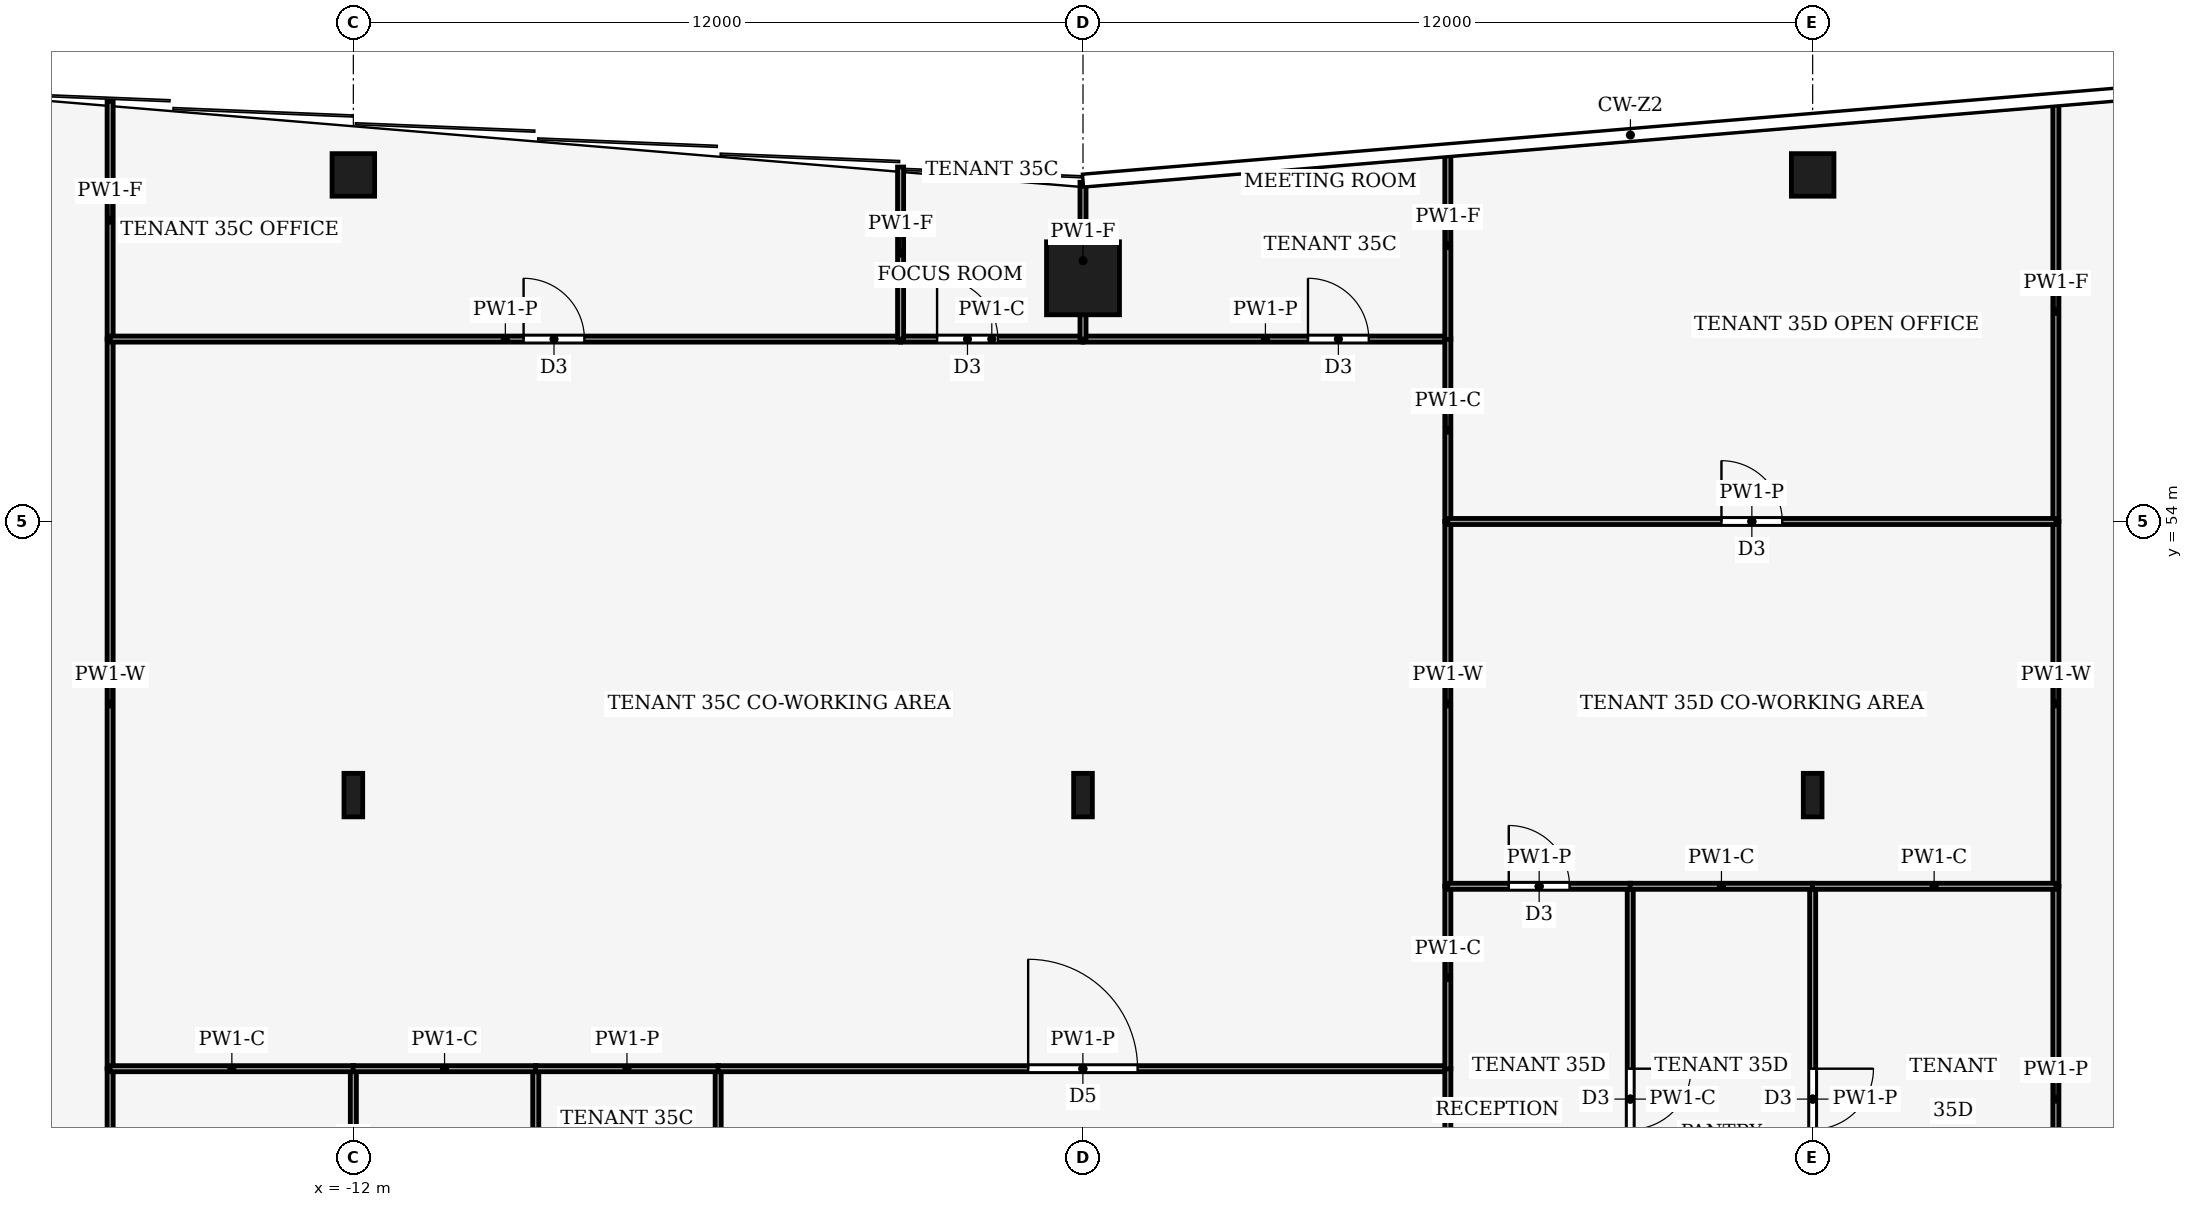
"""IFC4 building model, lengths in metres.
Left out: names, types, materials, properties, quantities, classifications, styles, units other than length and angle.
Written with IfcOpenShell. Run it as: python <this file> out.ifc"""

import sys

from ifc_helpers import new_model, si_unit, direction, frame, frame_2d, origin, origin_2d, place, context, subcontext, project, spatial, rectangle, hollow_rectangle, i_section, extrude, element, fill, save


model = new_model("IFC4")
c1 = context("Model", 3, precision=1e-05, world=origin(), true_north=direction((0.0, 1.0)))
c2 = subcontext(c1, "Body", "Model", "MODEL_VIEW")
j1 = project(units=[si_unit("LENGTHUNIT", "METRE"), si_unit("PLANEANGLEUNIT", "RADIAN")], contexts=[c1])
p1 = place(None, origin())
s1 = spatial("IfcSite", under=j1, at=p1, CompositionType="ELEMENT")
p2 = place(p1, origin())
s2 = spatial("IfcBuilding", under=s1, at=p2, CompositionType="ELEMENT")
p3 = place(p2, frame((0.0, 0.0, 154.0)))
s3 = spatial("IfcBuildingStorey", under=s2, at=p3, CompositionType="ELEMENT", Elevation=154.0)
p4 = place(p3, frame((0.0, 58.0, 0.0), z_axis=(0.0, 0.0, 1.0), x_axis=(1.0, 0.0, 0.0)))
e1 = element("IfcColumn", 1, at=p4, inside=s3, PredefinedType="COLUMN", context=c2, shape_type="SweptSolid", body=[
    extrude(hollow_rectangle(XDim=1.2, YDim=1.2, WallThickness=0.07, at=origin_2d()), origin(), (0.0, 0.0, 1.0), 4.0),
])
for number, where, z_axis, x_axis in (
    (2, (-12.0, 59.7, 0.0), (0.0, 0.0, 1.0), (1.0, 0.0, 0.0)),
    (3, (12.0, 59.7, 0.0), (0.0, 0.0, 1.0), (1.0, 0.0, 0.0)),
):
    element("IfcColumn", number, at=place(p3, frame(where, z_axis=z_axis, x_axis=x_axis)), inside=s3, PredefinedType="COLUMN", context=c2, shape_type="SweptSolid", body=[
        extrude(hollow_rectangle(XDim=0.7, YDim=0.7, WallThickness=0.03, at=origin_2d()), origin(), (0.0, 0.0, 1.0), 4.0),
    ])
for number, where, z_axis, x_axis in (
    (4, (-12.0, 49.5, 0.0), (0.0, 0.0, 1.0), (1.0, 0.0, 0.0)),
    (5, (0.0, 49.5, 0.0), (0.0, 0.0, 1.0), (1.0, 0.0, 0.0)),
    (6, (12.0, 49.5, 0.0), (0.0, 0.0, 1.0), (1.0, 0.0, 0.0)),
):
    element("IfcColumn", number, at=place(p3, frame(where, z_axis=z_axis, x_axis=x_axis)), inside=s3, PredefinedType="COLUMN", context=c2, shape_type="SweptSolid", body=[
        extrude(i_section(OverallWidth=0.308, OverallDepth=0.716, WebThickness=0.021, FlangeThickness=0.04, FilletRadius=0.027, at=origin_2d()), origin(), (0.0, 0.0, 1.0), 4.0),
    ])
p5 = place(p3, frame((-16.0, 41.0, 0.0), z_axis=(0.0, 0.0, 1.0), x_axis=(0.0, 1.0, 0.0)))
e7 = element("IfcWall", 7, at=p5, inside=s3, PredefinedType="PARTITIONING", context=c2, shape_type="SweptSolid", body=[
    extrude(rectangle(XDim=4.0, YDim=0.1, at=frame_2d((2.0, 0.0))), origin(), (0.0, 0.0, 1.0), 3.44),
])
p6 = place(p3, frame((-16.0, 45.0, 0.0), z_axis=(0.0, 0.0, 1.0), x_axis=(0.0, 1.0, 0.0)))
e8 = element("IfcWall", 8, at=p6, inside=s3, PredefinedType="PARTITIONING", context=c2, shape_type="SweptSolid", body=[
    extrude(rectangle(XDim=12.0, YDim=0.1, at=frame_2d((6.0, 0.0))), origin(), (0.0, 0.0, 1.0), 3.24),
])
p7 = place(p3, frame((-16.0, 57.0, 0.0), z_axis=(0.0, 0.0, 1.0), x_axis=(0.0, 1.0, 0.0)))
e9 = element("IfcWall", 9, at=p7, inside=s3, PredefinedType="PARTITIONING", context=c2, shape_type="SweptSolid", body=[
    extrude(rectangle(XDim=3.913, YDim=0.1, at=frame_2d((1.957, 0.0))), origin(), (0.0, 0.0, 1.0), 3.04),
])
p8 = place(p3, frame((16.0, 48.0, 0.0), z_axis=(0.0, 0.0, 1.0), x_axis=(0.0, -1.0, 0.0)))
e10 = element("IfcWall", 10, at=p8, inside=s3, PredefinedType="PARTITIONING", context=c2, shape_type="SweptSolid", body=[
    extrude(rectangle(XDim=7.0, YDim=0.1, at=frame_2d((3.5, 0.0))), origin(), (0.0, 0.0, 1.0), 3.44),
])
p9 = place(p3, frame((16.0, 54.0, 0.0), z_axis=(0.0, 0.0, 1.0), x_axis=(0.0, -1.0, 0.0)))
e11 = element("IfcWall", 11, at=p9, inside=s3, PredefinedType="PARTITIONING", context=c2, shape_type="SweptSolid", body=[
    extrude(rectangle(XDim=6.0, YDim=0.1, at=frame_2d((3.0, 0.0))), origin(), (0.0, 0.0, 1.0), 3.24),
])
p10 = place(p3, frame((16.0, 60.913, 0.0), z_axis=(0.0, 0.0, 1.0), x_axis=(0.0, -1.0, 0.0)))
e12 = element("IfcWall", 12, at=p10, inside=s3, PredefinedType="PARTITIONING", context=c2, shape_type="SweptSolid", body=[
    extrude(rectangle(XDim=6.913, YDim=0.1, at=frame_2d((3.457, 0.0))), origin(), (0.0, 0.0, 1.0), 3.04),
])
p11 = place(p3, frame((-12.0, 45.0, 0.0), z_axis=(0.0, 0.0, 1.0), x_axis=(0.0, -1.0, 0.0)))
e13 = element("IfcWall", 13, at=p11, inside=s3, PredefinedType="PARTITIONING", context=c2, shape_type="SweptSolid", body=[
    extrude(rectangle(XDim=4.0, YDim=0.1, at=frame_2d((2.0, 0.0))), origin(), (0.0, 0.0, 1.0), 3.44),
])
p12 = place(p11, frame((1.1, 0.0, 0.0)))
e14 = element("IfcOpeningElement", 14, at=p12, cuts=e13, PredefinedType="OPENING", context=c2, shape_type="SweptSolid", body=[
    extrude(rectangle(XDim=1.0, YDim=2.1, at=frame_2d((0.5, 1.05))), frame((0.0, 0.06, 0.0), z_axis=(0.0, -1.0, 0.0), x_axis=(1.0, 0.0, 0.0)), (0.0, 0.0, 1.0), 0.12),
])
p13 = place(p3, frame((-11.996, 45.0, 0.0), z_axis=(0.0, 0.0, 1.0), x_axis=(-1.0, 0.0, 0.0)))
e15 = element("IfcWall", 15, at=p13, inside=s3, PredefinedType="PARTITIONING", context=c2, shape_type="SweptSolid", body=[
    extrude(rectangle(XDim=4.004, YDim=0.1, at=frame_2d((2.002, 0.0))), origin(), (0.0, 0.0, 1.0), 3.87),
])
p14 = place(p3, frame((-9.0, 41.0, 0.0), z_axis=(0.0, 0.0, 1.0), x_axis=(0.0, 1.0, 0.0)))
e16 = element("IfcWall", 16, at=p14, inside=s3, PredefinedType="PARTITIONING", context=c2, shape_type="SweptSolid", body=[
    extrude(rectangle(XDim=4.0, YDim=0.1, at=frame_2d((2.0, 0.0))), origin(), (0.0, 0.0, 1.0), 3.87),
])
p15 = place(p3, frame((-8.996, 45.0, 0.0), z_axis=(0.0, 0.0, 1.0), x_axis=(-1.0, 0.0, 0.0)))
e17 = element("IfcWall", 17, at=p15, inside=s3, PredefinedType="PARTITIONING", context=c2, shape_type="SweptSolid", body=[
    extrude(rectangle(XDim=3.008, YDim=0.1, at=frame_2d((1.504, 0.0))), origin(), (0.0, 0.0, 1.0), 3.87),
])
p16 = place(p3, frame((-6.0, 41.0, 0.0), z_axis=(0.0, 0.0, 1.0), x_axis=(0.0, 1.0, 0.0)))
e18 = element("IfcWall", 18, at=p16, inside=s3, PredefinedType="PARTITIONING", context=c2, shape_type="SweptSolid", body=[
    extrude(rectangle(XDim=4.0, YDim=0.1, at=frame_2d((2.0, 0.0))), origin(), (0.0, 0.0, 1.0), 3.87),
])
p17 = place(p16, frame((1.5, 0.0, 0.0)))
e19 = element("IfcOpeningElement", 19, at=p17, cuts=e18, PredefinedType="OPENING", context=c2, shape_type="SweptSolid", body=[
    extrude(rectangle(XDim=1.0, YDim=2.1, at=frame_2d((0.5, 1.05))), frame((0.0, 0.06, 0.0), z_axis=(0.0, -1.0, 0.0), x_axis=(1.0, 0.0, 0.0)), (0.0, 0.0, 1.0), 0.12),
])
p18 = place(p3, frame((-5.996, 45.0, 0.0), z_axis=(0.0, 0.0, 1.0), x_axis=(-1.0, 0.0, 0.0)))
e20 = element("IfcWall", 20, at=p18, inside=s3, PredefinedType="PARTITIONING", context=c2, shape_type="SweptSolid", body=[
    extrude(rectangle(XDim=3.008, YDim=0.1, at=frame_2d((1.504, 0.0))), origin(), (0.0, 0.0, 1.0), 3.44),
])
p19 = place(p3, frame((-6.004, 45.0, 0.0), z_axis=(0.0, 0.0, 1.0), x_axis=(1.0, 0.0, 0.0)))
e21 = element("IfcWall", 21, at=p19, inside=s3, PredefinedType="PARTITIONING", context=c2, shape_type="SweptSolid", body=[
    extrude(rectangle(XDim=12.004, YDim=0.1, at=frame_2d((6.002, 0.0))), origin(), (0.0, 0.0, 1.0), 3.44),
])
p20 = place(p19, frame((5.102, 0.0, 0.0)))
e22 = element("IfcOpeningElement", 22, at=p20, cuts=e21, PredefinedType="OPENING", context=c2, shape_type="SweptSolid", body=[
    extrude(rectangle(XDim=1.8, YDim=2.1, at=frame_2d((0.9, 1.05))), frame((0.0, 0.06, 0.0), z_axis=(0.0, -1.0, 0.0), x_axis=(1.0, 0.0, 0.0)), (0.0, 0.0, 1.0), 0.12),
])
p21 = place(p3, frame((6.0, 41.0, 0.0), z_axis=(0.0, 0.0, 1.0), x_axis=(0.0, 1.0, 0.0)))
e23 = element("IfcWall", 23, at=p21, inside=s3, PredefinedType="PARTITIONING", context=c2, shape_type="SweptSolid", body=[
    extrude(rectangle(XDim=4.004, YDim=0.1, at=frame_2d((2.002, 0.0))), origin(), (0.0, 0.0, 1.0), 3.87),
])
p22 = place(p3, frame((-16.0, 57.0, 0.0), z_axis=(0.0, 0.0, 1.0), x_axis=(1.0, 0.0, 0.0)))
e24 = element("IfcWall", 24, at=p22, inside=s3, PredefinedType="PARTITIONING", context=c2, shape_type="SweptSolid", body=[
    extrude(rectangle(XDim=13.0, YDim=0.1, at=frame_2d((6.5, 0.0))), origin(), (0.0, 0.0, 1.0), 3.44),
])
p23 = place(p22, frame((6.8, 0.0, 0.0)))
e25 = element("IfcOpeningElement", 25, at=p23, cuts=e24, PredefinedType="OPENING", context=c2, shape_type="SweptSolid", body=[
    extrude(rectangle(XDim=1.0, YDim=2.1, at=frame_2d((0.5, 1.05))), frame((0.0, 0.06, 0.0), z_axis=(0.0, -1.0, 0.0), x_axis=(1.0, 0.0, 0.0)), (0.0, 0.0, 1.0), 0.12),
])
p24 = place(p3, frame((-3.0, 57.0, 0.0), z_axis=(0.0, 0.0, 1.0), x_axis=(1.0, 0.0, 0.0)))
e26 = element("IfcWall", 26, at=p24, inside=s3, PredefinedType="PARTITIONING", context=c2, shape_type="SweptSolid", body=[
    extrude(rectangle(XDim=3.0, YDim=0.1, at=frame_2d((1.5, 0.0))), origin(), (0.0, 0.0, 1.0), 3.87),
])
p25 = place(p24, frame((0.6, 0.0, 0.0)))
e27 = element("IfcOpeningElement", 27, at=p25, cuts=e26, PredefinedType="OPENING", context=c2, shape_type="SweptSolid", body=[
    extrude(rectangle(XDim=1.0, YDim=2.1, at=frame_2d((0.5, 1.05))), frame((0.0, 0.06, 0.0), z_axis=(0.0, -1.0, 0.0), x_axis=(1.0, 0.0, 0.0)), (0.0, 0.0, 1.0), 0.12),
])
p26 = place(p3, frame((0.0, 57.0, 0.0), z_axis=(0.0, 0.0, 1.0), x_axis=(1.0, 0.0, 0.0)))
e28 = element("IfcWall", 28, at=p26, inside=s3, PredefinedType="PARTITIONING", context=c2, shape_type="SweptSolid", body=[
    extrude(rectangle(XDim=6.0, YDim=0.1, at=frame_2d((3.0, 0.0))), origin(), (0.0, 0.0, 1.0), 3.44),
])
p27 = place(p26, frame((3.7, 0.0, 0.0)))
e29 = element("IfcOpeningElement", 29, at=p27, cuts=e28, PredefinedType="OPENING", context=c2, shape_type="SweptSolid", body=[
    extrude(rectangle(XDim=1.0, YDim=2.1, at=frame_2d((0.5, 1.05))), frame((0.0, 0.06, 0.0), z_axis=(0.0, -1.0, 0.0), x_axis=(1.0, 0.0, 0.0)), (0.0, 0.0, 1.0), 0.12),
])
p28 = place(p3, frame((6.0, 44.996, 0.0), z_axis=(0.0, 0.0, 1.0), x_axis=(0.0, 1.0, 0.0)))
e30 = element("IfcWall", 30, at=p28, inside=s3, PredefinedType="PARTITIONING", context=c2, shape_type="SweptSolid", body=[
    extrude(rectangle(XDim=3.004, YDim=0.1, at=frame_2d((1.502, 0.0))), origin(), (0.0, 0.0, 1.0), 3.87),
])
p29 = place(p3, frame((6.0, 48.0, 0.0), z_axis=(0.0, 0.0, 1.0), x_axis=(0.0, 1.0, 0.0)))
e31 = element("IfcWall", 31, at=p29, inside=s3, PredefinedType="PARTITIONING", context=c2, shape_type="SweptSolid", body=[
    extrude(rectangle(XDim=6.0, YDim=0.1, at=frame_2d((3.0, 0.0))), origin(), (0.0, 0.0, 1.0), 3.24),
])
p30 = place(p3, frame((6.0, 54.0, 0.0), z_axis=(0.0, 0.0, 1.0), x_axis=(0.0, 1.0, 0.0)))
e32 = element("IfcWall", 32, at=p30, inside=s3, PredefinedType="PARTITIONING", context=c2, shape_type="SweptSolid", body=[
    extrude(rectangle(XDim=3.004, YDim=0.1, at=frame_2d((1.502, 0.0))), origin(), (0.0, 0.0, 1.0), 3.87),
])
p31 = place(p3, frame((-3.0, 57.0, 0.0), z_axis=(0.0, 0.0, 1.0), x_axis=(0.0, 1.0, 0.0)))
e33 = element("IfcWall", 33, at=p31, inside=s3, PredefinedType="PARTITIONING", context=c2, shape_type="SweptSolid", body=[
    extrude(rectangle(XDim=2.83, YDim=0.1, at=frame_2d((1.415, 0.0))), origin(), (0.0, 0.0, 1.0), 3.04),
])
p32 = place(p3, frame((0.0, 57.0, 0.0), z_axis=(0.0, 0.0, 1.0), x_axis=(0.0, 1.0, 0.0)))
e34 = element("IfcWall", 34, at=p32, inside=s3, PredefinedType="PARTITIONING", context=c2, shape_type="SweptSolid", body=[
    extrude(rectangle(XDim=2.58, YDim=0.1, at=frame_2d((1.29, 0.0))), origin(), (0.0, 0.0, 1.0), 3.04),
])
p33 = place(p3, frame((6.0, 56.996, 0.0), z_axis=(0.0, 0.0, 1.0), x_axis=(0.0, 1.0, 0.0)))
e35 = element("IfcWall", 35, at=p33, inside=s3, PredefinedType="PARTITIONING", context=c2, shape_type="SweptSolid", body=[
    extrude(rectangle(XDim=3.084, YDim=0.1, at=frame_2d((1.542, 0.0))), origin(), (0.0, 0.0, 1.0), 3.04),
])
p34 = place(p3, frame((9.0, 48.0, 0.0), z_axis=(0.0, 0.0, 1.0), x_axis=(0.0, -1.0, 0.0)))
e36 = element("IfcWall", 36, at=p34, inside=s3, PredefinedType="PARTITIONING", context=c2, shape_type="SweptSolid", body=[
    extrude(rectangle(XDim=7.0, YDim=0.1, at=frame_2d((3.5, 0.0))), origin(), (0.0, 0.0, 1.0), 3.87),
])
p35 = place(p34, frame((3.0, 0.0, 0.0)))
e37 = element("IfcOpeningElement", 37, at=p35, cuts=e36, PredefinedType="OPENING", context=c2, shape_type="SweptSolid", body=[
    extrude(rectangle(XDim=1.0, YDim=2.1, at=frame_2d((0.5, 1.05))), frame((0.0, 0.06, 0.0), z_axis=(0.0, -1.0, 0.0), x_axis=(1.0, 0.0, 0.0)), (0.0, 0.0, 1.0), 0.12),
])
p36 = place(p3, frame((6.0, 48.0, 0.0), z_axis=(0.0, 0.0, 1.0), x_axis=(1.0, 0.0, 0.0)))
e38 = element("IfcWall", 38, at=p36, inside=s3, PredefinedType="PARTITIONING", context=c2, shape_type="SweptSolid", body=[
    extrude(rectangle(XDim=3.004, YDim=0.1, at=frame_2d((1.502, 0.0))), origin(), (0.0, 0.0, 1.0), 3.44),
])
p37 = place(p36, frame((1.002, 0.0, 0.0)))
e39 = element("IfcOpeningElement", 39, at=p37, cuts=e38, PredefinedType="OPENING", context=c2, shape_type="SweptSolid", body=[
    extrude(rectangle(XDim=1.0, YDim=2.1, at=frame_2d((0.5, 1.05))), frame((0.0, 0.06, 0.0), z_axis=(0.0, -1.0, 0.0), x_axis=(1.0, 0.0, 0.0)), (0.0, 0.0, 1.0), 0.12),
])
p38 = place(p3, frame((12.0, 48.0, 0.0), z_axis=(0.0, 0.0, 1.0), x_axis=(0.0, -1.0, 0.0)))
e40 = element("IfcWall", 40, at=p38, inside=s3, PredefinedType="PARTITIONING", context=c2, shape_type="SweptSolid", body=[
    extrude(rectangle(XDim=7.0, YDim=0.1, at=frame_2d((3.5, 0.0))), origin(), (0.0, 0.0, 1.0), 3.44),
])
p39 = place(p38, frame((3.0, 0.0, 0.0)))
e41 = element("IfcOpeningElement", 41, at=p39, cuts=e40, PredefinedType="OPENING", context=c2, shape_type="SweptSolid", body=[
    extrude(rectangle(XDim=1.0, YDim=2.1, at=frame_2d((0.5, 1.05))), frame((0.0, 0.06, 0.0), z_axis=(0.0, -1.0, 0.0), x_axis=(1.0, 0.0, 0.0)), (0.0, 0.0, 1.0), 0.12),
])
p40 = place(p3, frame((12.004, 48.0, 0.0), z_axis=(0.0, 0.0, 1.0), x_axis=(-1.0, 0.0, 0.0)))
e42 = element("IfcWall", 42, at=p40, inside=s3, PredefinedType="PARTITIONING", context=c2, shape_type="SweptSolid", body=[
    extrude(rectangle(XDim=3.008, YDim=0.1, at=frame_2d((1.504, 0.0))), origin(), (0.0, 0.0, 1.0), 3.87),
])
p41 = place(p3, frame((16.0, 48.0, 0.0), z_axis=(0.0, 0.0, 1.0), x_axis=(-1.0, 0.0, 0.0)))
e43 = element("IfcWall", 43, at=p41, inside=s3, PredefinedType="PARTITIONING", context=c2, shape_type="SweptSolid", body=[
    extrude(rectangle(XDim=4.004, YDim=0.1, at=frame_2d((2.002, 0.0))), origin(), (0.0, 0.0, 1.0), 3.87),
])
p42 = place(p3, frame((6.0, 54.0, 0.0), z_axis=(0.0, 0.0, 1.0), x_axis=(1.0, 0.0, 0.0)))
e44 = element("IfcWall", 44, at=p42, inside=s3, PredefinedType="PARTITIONING", context=c2, shape_type="SweptSolid", body=[
    extrude(rectangle(XDim=10.0, YDim=0.1, at=frame_2d((5.0, 0.0))), origin(), (0.0, 0.0, 1.0), 3.44),
])
p43 = place(p42, frame((4.5, 0.0, 0.0)))
e45 = element("IfcOpeningElement", 45, at=p43, cuts=e44, PredefinedType="OPENING", context=c2, shape_type="SweptSolid", body=[
    extrude(rectangle(XDim=1.0, YDim=2.1, at=frame_2d((0.5, 1.05))), frame((0.0, 0.06, 0.0), z_axis=(0.0, -1.0, 0.0), x_axis=(1.0, 0.0, 0.0)), (0.0, 0.0, 1.0), 0.12),
])
p44 = place(p20, origin())
e46 = element("IfcDoor", 46, at=p44, inside=s3, OperationType="DOUBLE_DOOR_SINGLE_SWING", PredefinedType="DOOR", context=c2, shape_type="SweptSolid", body=[
    extrude(rectangle(XDim=1.8, YDim=2.1, at=frame_2d((0.9, 1.05))), frame((0.0, 0.025, 0.0), z_axis=(0.0, -1.0, 0.0), x_axis=(1.0, 0.0, 0.0)), (0.0, 0.0, 1.0), 0.05),
])
fill(e22, e46)
p45 = place(p23, origin())
e47 = element("IfcDoor", 47, at=p45, inside=s3, OperationType="SINGLE_SWING_RIGHT", PredefinedType="DOOR", context=c2, shape_type="SweptSolid", body=[
    extrude(rectangle(XDim=1.0, YDim=2.1, at=frame_2d((0.5, 1.05))), frame((0.0, 0.025, 0.0), z_axis=(0.0, -1.0, 0.0), x_axis=(1.0, 0.0, 0.0)), (0.0, 0.0, 1.0), 0.05),
])
fill(e25, e47)
p46 = place(p25, origin())
e48 = element("IfcDoor", 48, at=p46, inside=s3, OperationType="SINGLE_SWING_LEFT", PredefinedType="DOOR", context=c2, shape_type="SweptSolid", body=[
    extrude(rectangle(XDim=1.0, YDim=2.1, at=frame_2d((0.5, 1.05))), frame((0.0, 0.025, 0.0), z_axis=(0.0, -1.0, 0.0), x_axis=(1.0, 0.0, 0.0)), (0.0, 0.0, 1.0), 0.05),
])
fill(e27, e48)
p47 = place(p27, origin())
e49 = element("IfcDoor", 49, at=p47, inside=s3, OperationType="SINGLE_SWING_RIGHT", PredefinedType="DOOR", context=c2, shape_type="SweptSolid", body=[
    extrude(rectangle(XDim=1.0, YDim=2.1, at=frame_2d((0.5, 1.05))), frame((0.0, 0.025, 0.0), z_axis=(0.0, -1.0, 0.0), x_axis=(1.0, 0.0, 0.0)), (0.0, 0.0, 1.0), 0.05),
])
fill(e29, e49)
p48 = place(p35, origin())
e50 = element("IfcDoor", 50, at=p48, inside=s3, OperationType="SINGLE_SWING_RIGHT", PredefinedType="DOOR", context=c2, shape_type="SweptSolid", body=[
    extrude(rectangle(XDim=1.0, YDim=2.1, at=frame_2d((0.5, 1.05))), frame((0.0, 0.025, 0.0), z_axis=(0.0, -1.0, 0.0), x_axis=(1.0, 0.0, 0.0)), (0.0, 0.0, 1.0), 0.05),
])
fill(e37, e50)
p49 = place(p37, origin())
e51 = element("IfcDoor", 51, at=p49, inside=s3, OperationType="SINGLE_SWING_LEFT", PredefinedType="DOOR", context=c2, shape_type="SweptSolid", body=[
    extrude(rectangle(XDim=1.0, YDim=2.1, at=frame_2d((0.5, 1.05))), frame((0.0, 0.025, 0.0), z_axis=(0.0, -1.0, 0.0), x_axis=(1.0, 0.0, 0.0)), (0.0, 0.0, 1.0), 0.05),
])
fill(e39, e51)
p50 = place(p39, origin())
e52 = element("IfcDoor", 52, at=p50, inside=s3, OperationType="SINGLE_SWING_RIGHT", PredefinedType="DOOR", context=c2, shape_type="SweptSolid", body=[
    extrude(rectangle(XDim=1.0, YDim=2.1, at=frame_2d((0.5, 1.05))), frame((0.0, 0.025, 0.0), z_axis=(0.0, -1.0, 0.0), x_axis=(1.0, 0.0, 0.0)), (0.0, 0.0, 1.0), 0.05),
])
fill(e41, e52)
p51 = place(p43, origin())
e53 = element("IfcDoor", 53, at=p51, inside=s3, OperationType="SINGLE_SWING_LEFT", PredefinedType="DOOR", context=c2, shape_type="SweptSolid", body=[
    extrude(rectangle(XDim=1.0, YDim=2.1, at=frame_2d((0.5, 1.05))), frame((0.0, 0.025, 0.0), z_axis=(0.0, -1.0, 0.0), x_axis=(1.0, 0.0, 0.0)), (0.0, 0.0, 1.0), 0.05),
])
fill(e45, e53)
save(model, sys.argv[1])
